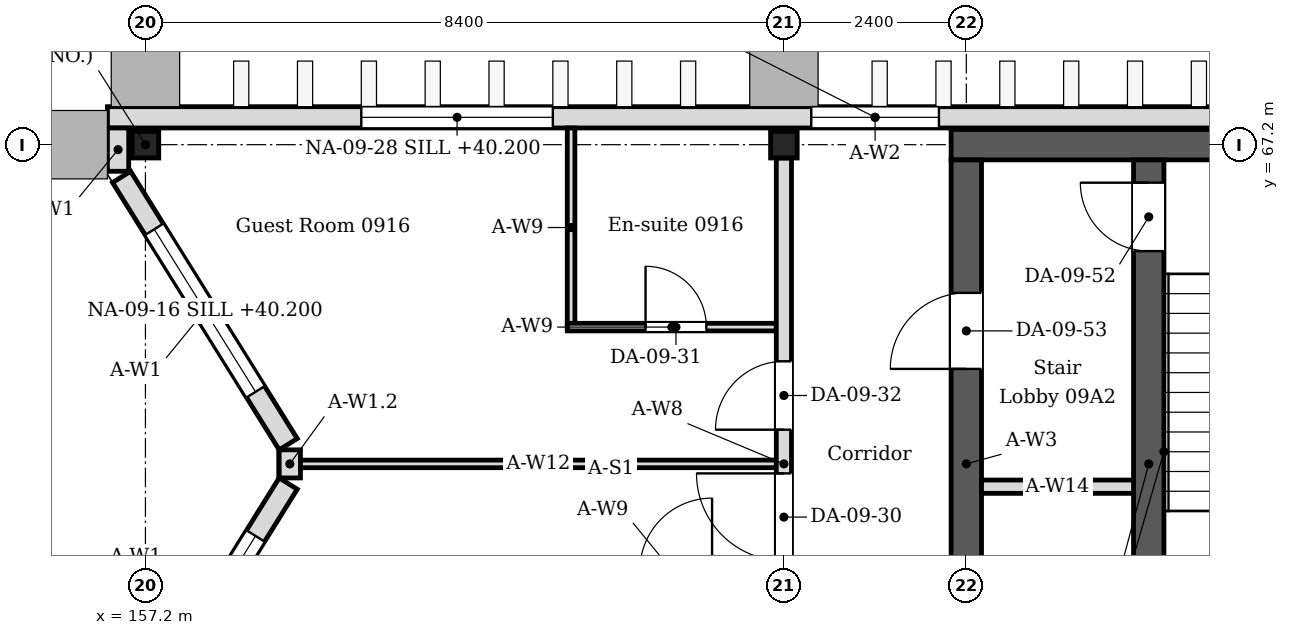
"""IFC4 building model, lengths in metres.
Left out: names, types, materials, properties, quantities, classifications, styles, units other than length and angle.
Written with IfcOpenShell. Run it as: python <this file> out.ifc"""

import sys

from ifc_helpers import new_model, si_unit, direction, frame, frame_2d, origin, origin_2d, place, context, subcontext, project, spatial, rectangle, i_section, extrude, element, fill, save


model = new_model("IFC4")
c1 = context("Model", 3, precision=1e-05, world=origin(), true_north=direction((0.0, 1.0)))
c2 = subcontext(c1, "Body", "Model", "MODEL_VIEW")
j1 = project(units=[si_unit("LENGTHUNIT", "METRE"), si_unit("PLANEANGLEUNIT", "RADIAN")], contexts=[c1])
p1 = place(None, origin())
s1 = spatial("IfcSite", under=j1, at=p1, CompositionType="ELEMENT")
p2 = place(p1, origin())
s2 = spatial("IfcBuilding", under=s1, at=p2, CompositionType="ELEMENT")
p3 = place(p2, frame((0.0, 0.0, 39.6)))
s3 = spatial("IfcBuildingStorey", under=s2, at=p3, CompositionType="ELEMENT", Elevation=39.6)
for number, where, z_axis, x_axis in (
    (1, (157.2, 67.2, 0.0), (0.0, 0.0, 1.0), (1.0, 0.0, 0.0)),
    (2, (165.6, 67.2, 0.0), (0.0, 0.0, 1.0), (1.0, 0.0, 0.0)),
):
    element("IfcColumn", number, at=place(p3, frame(where, z_axis=z_axis, x_axis=x_axis)), inside=s3, PredefinedType="COLUMN", context=c2, shape_type="SweptSolid", body=[
        extrude(i_section(OverallWidth=0.35, OverallDepth=0.35, WebThickness=0.012, FlangeThickness=0.019, FilletRadius=0.013, at=origin_2d()), origin(), (0.0, 0.0, 1.0), 4.2),
    ])
p4 = place(p3, frame((167.8, 67.2, 0.0), z_axis=(0.0, 0.0, 1.0), x_axis=(1.0, 0.0, 0.0)))
e3 = element("IfcWall", 3, at=p4, inside=s3, PredefinedType="SOLIDWALL", context=c2, shape_type="SweptSolid", body=[
    extrude(rectangle(XDim=8.8, YDim=0.4, at=frame_2d((4.4, 0.0))), origin(), (0.0, 0.0, 1.0), 4.05),
])
p5 = place(p3, frame((168.0, 59.0, 0.0), z_axis=(0.0, 0.0, 1.0), x_axis=(0.0, 1.0, 0.0)))
e4 = element("IfcWall", 4, at=p5, inside=s3, PredefinedType="SOLIDWALL", context=c2, shape_type="SweptSolid", body=[
    extrude(rectangle(XDim=8.0, YDim=0.4, at=frame_2d((4.0, 0.0))), origin(), (0.0, 0.0, 1.0), 4.05),
])
p6 = place(p5, frame((5.25, 0.0, 0.0)))
e5 = element("IfcOpeningElement", 5, at=p6, cuts=e4, PredefinedType="OPENING", context=c2, shape_type="SweptSolid", body=[
    extrude(rectangle(XDim=1.0, YDim=2.1, at=frame_2d((0.5, 1.05))), frame((0.0, 0.21, 0.0), z_axis=(0.0, -1.0, 0.0), x_axis=(1.0, 0.0, 0.0)), (0.0, 0.0, 1.0), 0.42),
])
p7 = place(p5, frame((1.275, 0.0, 0.0)))
e6 = element("IfcOpeningElement", 6, at=p7, cuts=e4, PredefinedType="OPENING", context=c2, shape_type="SweptSolid", body=[
    extrude(rectangle(XDim=1.05, YDim=2.1, at=frame_2d((0.525, 1.05))), frame((0.0, 0.21, 0.0), z_axis=(0.0, -1.0, 0.0), x_axis=(1.0, 0.0, 0.0)), (0.0, 0.0, 1.0), 0.42),
])
p8 = place(p3, frame((156.886, 59.224, 0.0), z_axis=(0.0, 0.0, 1.0), x_axis=(0.529018946142, 0.848610013271, 0.0)))
e7 = element("IfcWall", 7, at=p8, inside=s3, PredefinedType="SOLIDWALL", context=c2, shape_type="SweptSolid", body=[
    extrude(rectangle(XDim=4.144, YDim=0.28, at=frame_2d((2.072, 0.0))), origin(), (0.0, 0.0, 1.0), 4.05),
])
p9 = place(p8, frame((0.812, 0.0, 0.45)))
e8 = element("IfcOpeningElement", 8, at=p9, cuts=e7, PredefinedType="OPENING", context=c2, shape_type="SweptSolid", body=[
    extrude(rectangle(XDim=2.52, YDim=2.1, at=frame_2d((1.26, 1.05))), frame((0.0, 0.15, 0.0), z_axis=(0.0, -1.0, 0.0), x_axis=(1.0, 0.0, 0.0)), (0.0, 0.0, 1.0), 0.3),
])
p10 = place(p3, frame((159.079, 63.259, 0.0), z_axis=(0.0, 0.0, 1.0), x_axis=(-0.529018946142, 0.848610013271, 0.0)))
e9 = element("IfcWall", 9, at=p10, inside=s3, PredefinedType="SOLIDWALL", context=c2, shape_type="SweptSolid", body=[
    extrude(rectangle(XDim=4.144, YDim=0.28, at=frame_2d((2.072, 0.0))), origin(), (0.0, 0.0, 1.0), 4.05),
])
p11 = place(p10, frame((0.812, 0.0, 0.6)))
e10 = element("IfcOpeningElement", 10, at=p11, cuts=e9, PredefinedType="OPENING", context=c2, shape_type="SweptSolid", body=[
    extrude(rectangle(XDim=2.52, YDim=2.4, at=frame_2d((1.26, 1.2))), frame((0.0, 0.15, 0.0), z_axis=(0.0, -1.0, 0.0), x_axis=(1.0, 0.0, 0.0)), (0.0, 0.0, 1.0), 0.3),
])
p12 = place(p3, frame((159.1, 62.815, 0.0), z_axis=(0.0, 0.0, 1.0), x_axis=(0.0, 1.0, 0.0)))
e11 = element("IfcWall", 11, at=p12, inside=s3, PredefinedType="SOLIDWALL", context=c2, shape_type="SweptSolid", body=[
    extrude(rectangle(XDim=0.37, YDim=0.28, at=frame_2d((0.185, 0.0))), origin(), (0.0, 0.0, 1.0), 3.604),
])
p13 = place(p3, frame((156.84, 66.85, 0.0), z_axis=(0.0, 0.0, 1.0), x_axis=(0.0, 1.0, 0.0)))
e12 = element("IfcWall", 12, at=p13, inside=s3, PredefinedType="SOLIDWALL", context=c2, shape_type="SweptSolid", body=[
    extrude(rectangle(XDim=0.57, YDim=0.28, at=frame_2d((0.285, 0.0))), origin(), (0.0, 0.0, 1.0), 4.05),
])
p14 = place(p3, frame((156.7, 67.56, 0.0), z_axis=(0.0, 0.0, 1.0), x_axis=(1.0, 0.0, 0.0)))
e13 = element("IfcWall", 13, at=p14, inside=s3, PredefinedType="SOLIDWALL", context=c2, shape_type="SweptSolid", body=[
    extrude(rectangle(XDim=20.2, YDim=0.28, at=frame_2d((10.1, 0.0))), origin(), (0.0, 0.0, 1.0), 4.05),
])
p15 = place(p14, frame((9.26, 0.0, 0.6)))
e14 = element("IfcOpeningElement", 14, at=p15, cuts=e13, PredefinedType="OPENING", context=c2, shape_type="SweptSolid", body=[
    extrude(rectangle(XDim=1.68, YDim=2.4, at=frame_2d((0.84, 1.2))), frame((0.0, 0.15, 0.0), z_axis=(0.0, -1.0, 0.0), x_axis=(1.0, 0.0, 0.0)), (0.0, 0.0, 1.0), 0.3),
])
p16 = place(p14, frame((3.34, 0.0, 0.6)))
e15 = element("IfcOpeningElement", 15, at=p16, cuts=e13, PredefinedType="OPENING", context=c2, shape_type="SweptSolid", body=[
    extrude(rectangle(XDim=2.52, YDim=2.4, at=frame_2d((1.26, 1.2))), frame((0.0, 0.15, 0.0), z_axis=(0.0, -1.0, 0.0), x_axis=(1.0, 0.0, 0.0)), (0.0, 0.0, 1.0), 0.3),
])
p17 = place(p3, frame((162.8, 64.8, 0.0), z_axis=(0.0, 0.0, 1.0), x_axis=(0.0, 1.0, 0.0)))
e16 = element("IfcWall", 16, at=p17, inside=s3, PredefinedType="PARTITIONING", context=c2, shape_type="SweptSolid", body=[
    extrude(rectangle(XDim=2.62, YDim=0.1, at=frame_2d((1.31, 0.0))), origin(), (0.0, 0.0, 1.0), 4.05),
])
p18 = place(p3, frame((162.75, 64.8, 0.0), z_axis=(0.0, 0.0, 1.0), x_axis=(1.0, 0.0, 0.0)))
e17 = element("IfcWall", 17, at=p18, inside=s3, PredefinedType="PARTITIONING", context=c2, shape_type="SweptSolid", body=[
    extrude(rectangle(XDim=2.75, YDim=0.1, at=frame_2d((1.375, 0.0))), origin(), (0.0, 0.0, 1.0), 4.05),
])
p19 = place(p18, frame((1.03, 0.0, 0.0)))
e18 = element("IfcOpeningElement", 18, at=p19, cuts=e17, PredefinedType="OPENING", context=c2, shape_type="SweptSolid", body=[
    extrude(rectangle(XDim=0.8, YDim=2.1, at=frame_2d((0.4, 1.05))), frame((0.0, 0.06, 0.0), z_axis=(0.0, -1.0, 0.0), x_axis=(1.0, 0.0, 0.0)), (0.0, 0.0, 1.0), 0.12),
])
p20 = place(p3, frame((159.24, 63.0, 0.0), z_axis=(0.0, 0.0, 1.0), x_axis=(1.0, 0.0, 0.0)))
e19 = element("IfcWall", 19, at=p20, inside=s3, PredefinedType="PARTITIONING", context=c2, shape_type="SweptSolid", body=[
    extrude(rectangle(XDim=6.26, YDim=0.1, at=frame_2d((3.13, 0.0))), origin(), (0.0, 0.0, 1.0), 3.604),
])
p21 = place(p3, frame((165.6, 58.975, 0.0), z_axis=(0.0, 0.0, 1.0), x_axis=(0.0, 1.0, 0.0)))
e20 = element("IfcWall", 20, at=p21, inside=s3, PredefinedType="PARTITIONING", context=c2, shape_type="SweptSolid", body=[
    extrude(rectangle(XDim=8.05, YDim=0.2, at=frame_2d((4.025, 0.0))), origin(), (0.0, 0.0, 1.0), 3.45),
])
p22 = place(p21, frame((2.75, 0.0, 0.0)))
e21 = element("IfcOpeningElement", 21, at=p22, cuts=e20, PredefinedType="OPENING", context=c2, shape_type="SweptSolid", body=[
    extrude(rectangle(XDim=1.15, YDim=2.1, at=frame_2d((0.575, 1.05))), frame((0.0, 0.11, 0.0), z_axis=(0.0, -1.0, 0.0), x_axis=(1.0, 0.0, 0.0)), (0.0, 0.0, 1.0), 0.22),
])
p23 = place(p21, frame((4.475, 0.0, 0.0)))
e22 = element("IfcOpeningElement", 22, at=p23, cuts=e20, PredefinedType="OPENING", context=c2, shape_type="SweptSolid", body=[
    extrude(rectangle(XDim=0.9, YDim=2.1, at=frame_2d((0.45, 1.05))), frame((0.0, 0.11, 0.0), z_axis=(0.0, -1.0, 0.0), x_axis=(1.0, 0.0, 0.0)), (0.0, 0.0, 1.0), 0.22),
])
p24 = place(p3, frame((170.4, 59.0, 0.0), z_axis=(0.0, 0.0, 1.0), x_axis=(0.0, 1.0, 0.0)))
e23 = element("IfcWall", 23, at=p24, inside=s3, PredefinedType="SOLIDWALL", context=c2, shape_type="SweptSolid", body=[
    extrude(rectangle(XDim=8.0, YDim=0.4, at=frame_2d((4.0, 0.0))), origin(), (0.0, 0.0, 1.0), 4.05),
])
p25 = place(p24, frame((6.8, 0.0, 0.0)))
e24 = element("IfcOpeningElement", 24, at=p25, cuts=e23, PredefinedType="OPENING", context=c2, shape_type="SweptSolid", body=[
    extrude(rectangle(XDim=0.9, YDim=2.1, at=frame_2d((0.45, 1.05))), frame((0.0, 0.21, 0.0), z_axis=(0.0, -1.0, 0.0), x_axis=(1.0, 0.0, 0.0)), (0.0, 0.0, 1.0), 0.42),
])
p26 = place(p3, frame((168.2, 62.7, 0.0), z_axis=(0.0, 0.0, 1.0), x_axis=(1.0, 0.0, 0.0)))
e25 = element("IfcWall", 25, at=p26, inside=s3, PredefinedType="PARTITIONING", context=c2, shape_type="SweptSolid", body=[
    extrude(rectangle(XDim=2.0, YDim=0.175, at=frame_2d((1.0, 0.0))), origin(), (0.0, 0.0, 1.0), 4.05),
])
p27 = place(p9, origin())
e26 = element("IfcWindow", 26, at=p27, inside=s3, PartitioningType="SINGLE_PANEL", PredefinedType="WINDOW", context=c2, shape_type="SweptSolid", body=[
    extrude(rectangle(XDim=2.52, YDim=2.1, at=frame_2d((1.26, 1.05))), frame((0.0, 0.03, 0.0), z_axis=(0.0, -1.0, 0.0), x_axis=(1.0, 0.0, 0.0)), (0.0, 0.0, 1.0), 0.06),
])
fill(e8, e26)
p28 = place(p11, origin())
e27 = element("IfcWindow", 27, at=p28, inside=s3, PartitioningType="SINGLE_PANEL", PredefinedType="WINDOW", context=c2, shape_type="SweptSolid", body=[
    extrude(rectangle(XDim=2.52, YDim=2.4, at=frame_2d((1.26, 1.2))), frame((0.0, 0.03, 0.0), z_axis=(0.0, -1.0, 0.0), x_axis=(1.0, 0.0, 0.0)), (0.0, 0.0, 1.0), 0.06),
])
fill(e10, e27)
p29 = place(p15, origin())
e28 = element("IfcWindow", 28, at=p29, inside=s3, PartitioningType="SINGLE_PANEL", PredefinedType="WINDOW", context=c2, shape_type="SweptSolid", body=[
    extrude(rectangle(XDim=1.68, YDim=2.4, at=frame_2d((0.84, 1.2))), frame((0.0, 0.03, 0.0), z_axis=(0.0, -1.0, 0.0), x_axis=(1.0, 0.0, 0.0)), (0.0, 0.0, 1.0), 0.06),
])
fill(e14, e28)
p30 = place(p16, origin())
e29 = element("IfcWindow", 29, at=p30, inside=s3, PartitioningType="SINGLE_PANEL", PredefinedType="WINDOW", context=c2, shape_type="SweptSolid", body=[
    extrude(rectangle(XDim=2.52, YDim=2.4, at=frame_2d((1.26, 1.2))), frame((0.0, 0.03, 0.0), z_axis=(0.0, -1.0, 0.0), x_axis=(1.0, 0.0, 0.0)), (0.0, 0.0, 1.0), 0.06),
])
fill(e15, e29)
p31 = place(p22, origin())
e30 = element("IfcDoor", 30, at=p31, inside=s3, OperationType="SINGLE_SWING_RIGHT", PredefinedType="DOOR", context=c2, shape_type="SweptSolid", body=[
    extrude(rectangle(XDim=1.15, YDim=2.1, at=frame_2d((0.575, 1.05))), frame((0.0, 0.025, 0.0), z_axis=(0.0, -1.0, 0.0), x_axis=(1.0, 0.0, 0.0)), (0.0, 0.0, 1.0), 0.05),
])
fill(e21, e30)
p32 = place(p19, origin())
e31 = element("IfcDoor", 31, at=p32, inside=s3, OperationType="SINGLE_SWING_LEFT", PredefinedType="DOOR", context=c2, shape_type="SweptSolid", body=[
    extrude(rectangle(XDim=0.8, YDim=2.1, at=frame_2d((0.4, 1.05))), frame((0.0, 0.025, 0.0), z_axis=(0.0, -1.0, 0.0), x_axis=(1.0, 0.0, 0.0)), (0.0, 0.0, 1.0), 0.05),
])
fill(e18, e31)
p33 = place(p23, origin())
e32 = element("IfcDoor", 32, at=p33, inside=s3, OperationType="SINGLE_SWING_LEFT", PredefinedType="DOOR", context=c2, shape_type="SweptSolid", body=[
    extrude(rectangle(XDim=0.9, YDim=2.1, at=frame_2d((0.45, 1.05))), frame((0.0, 0.025, 0.0), z_axis=(0.0, -1.0, 0.0), x_axis=(1.0, 0.0, 0.0)), (0.0, 0.0, 1.0), 0.05),
])
fill(e22, e32)
p34 = place(p25, origin())
e33 = element("IfcDoor", 33, at=p34, inside=s3, OperationType="SINGLE_SWING_RIGHT", PredefinedType="DOOR", context=c2, shape_type="SweptSolid", body=[
    extrude(rectangle(XDim=0.9, YDim=2.1, at=frame_2d((0.45, 1.05))), frame((0.0, 0.025, 0.0), z_axis=(0.0, -1.0, 0.0), x_axis=(1.0, 0.0, 0.0)), (0.0, 0.0, 1.0), 0.05),
])
fill(e24, e33)
p35 = place(p6, origin())
e34 = element("IfcDoor", 34, at=p35, inside=s3, OperationType="SINGLE_SWING_LEFT", PredefinedType="DOOR", context=c2, shape_type="SweptSolid", body=[
    extrude(rectangle(XDim=1.0, YDim=2.1, at=frame_2d((0.5, 1.05))), frame((0.0, 0.025, 0.0), z_axis=(0.0, -1.0, 0.0), x_axis=(1.0, 0.0, 0.0)), (0.0, 0.0, 1.0), 0.05),
])
fill(e5, e34)
save(model, sys.argv[1])
